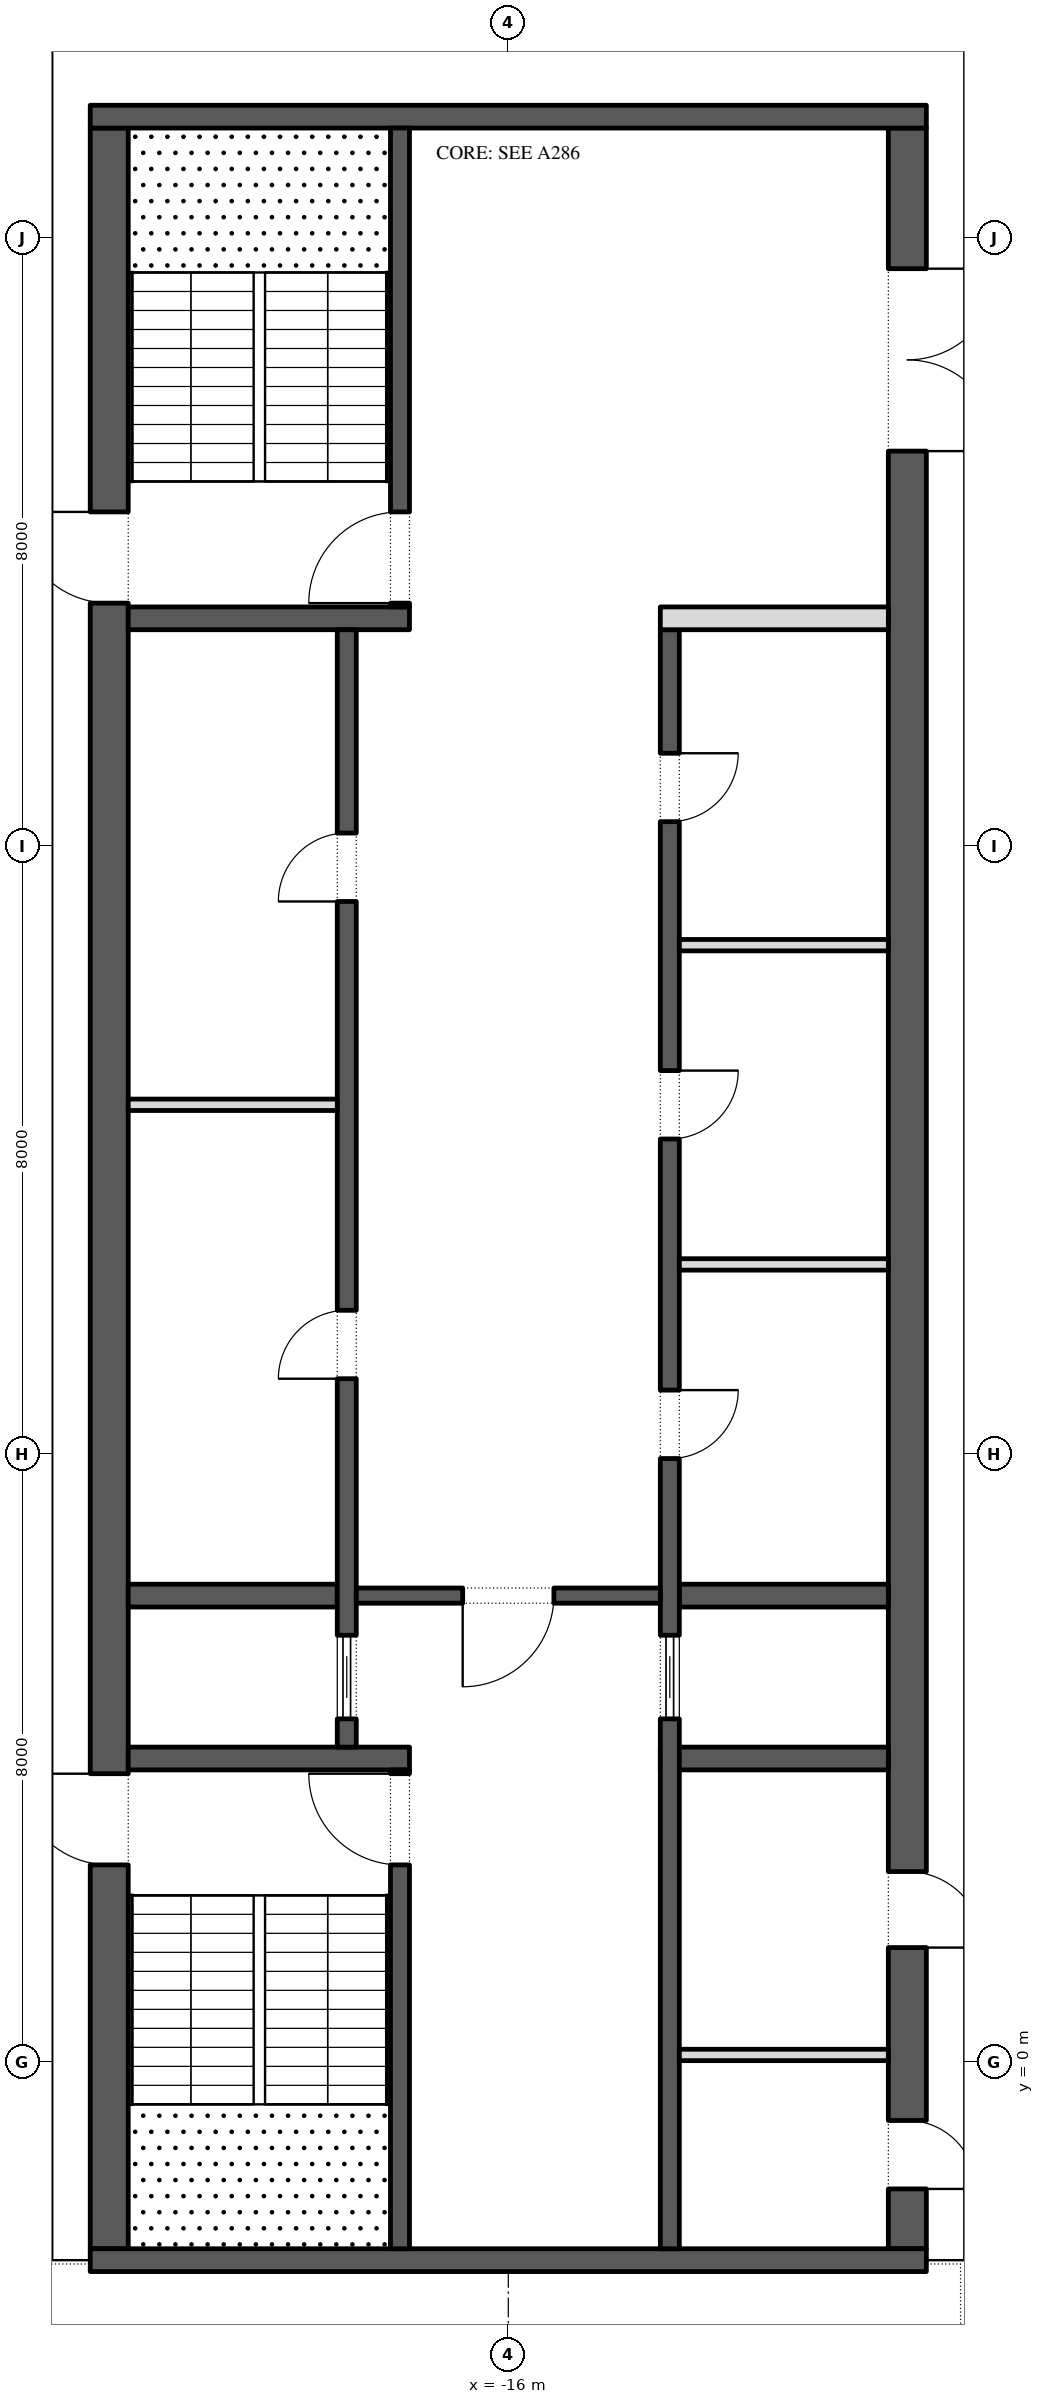
"""IFC4 building model, lengths in metres.
Left out: names, types, materials, properties, quantities, classifications, styles, units other than length and angle.
Written with IfcOpenShell. Run it as: python <this file> out.ifc"""

import sys

from ifc_helpers import new_model, si_unit, direction, frame, frame_2d, origin, place, context, subcontext, project, spatial, rectangle, extrude, element, fill, save


model = new_model("IFC4")
c1 = context("Model", 3, precision=1e-05, world=origin(), true_north=direction((0.0, 1.0)))
c2 = subcontext(c1, "Body", "Model", "MODEL_VIEW")
j1 = project(units=[si_unit("LENGTHUNIT", "METRE"), si_unit("PLANEANGLEUNIT", "RADIAN")], contexts=[c1])
p1 = place(None, origin())
s1 = spatial("IfcSite", under=j1, at=p1, CompositionType="ELEMENT")
p2 = place(p1, origin())
s2 = spatial("IfcBuilding", under=s1, at=p2, CompositionType="ELEMENT")
p3 = place(p2, frame((0.0, 0.0, 377.4)))
s3 = spatial("IfcBuildingStorey", under=s2, at=p3, CompositionType="ELEMENT", Elevation=377.4)
p4 = place(p3, frame((-21.25, -2.45, 0.0), z_axis=(0.0, 0.0, 1.0), x_axis=(0.0, 1.0, 0.0)))
e1 = element("IfcWall", 1, at=p4, inside=s3, PredefinedType="SHEAR", context=c2, shape_type="SweptSolid", body=[
    extrude(rectangle(XDim=27.9, YDim=0.5, at=frame_2d((13.95, 0.0))), origin(), (0.0, 0.0, 1.0), 4.0),
])
p5 = place(p4, frame((5.05, 0.0, 0.0)))
e2 = element("IfcOpeningElement", 2, at=p5, cuts=e1, PredefinedType="OPENING", context=c2, shape_type="SweptSolid", body=[
    extrude(rectangle(XDim=1.2, YDim=2.1, at=frame_2d((0.6, 1.05))), frame((0.0, 0.26, 0.0), z_axis=(0.0, -1.0, 0.0), x_axis=(1.0, 0.0, 0.0)), (0.0, 0.0, 1.0), 0.52),
])
p6 = place(p4, frame((21.65, 0.0, 0.0)))
e3 = element("IfcOpeningElement", 3, at=p6, cuts=e1, PredefinedType="OPENING", context=c2, shape_type="SweptSolid", body=[
    extrude(rectangle(XDim=1.2, YDim=2.1, at=frame_2d((0.6, 1.05))), frame((0.0, 0.26, 0.0), z_axis=(0.0, -1.0, 0.0), x_axis=(1.0, 0.0, 0.0)), (0.0, 0.0, 1.0), 0.52),
])
p7 = place(p3, frame((-10.75, -2.45, 0.0), z_axis=(0.0, 0.0, 1.0), x_axis=(0.0, 1.0, 0.0)))
e4 = element("IfcWall", 4, at=p7, inside=s3, PredefinedType="SHEAR", context=c2, shape_type="SweptSolid", body=[
    extrude(rectangle(XDim=27.9, YDim=0.5, at=frame_2d((13.95, 0.0))), origin(), (0.0, 0.0, 1.0), 4.0),
])
p8 = place(p7, frame((23.65, 0.0, 0.0)))
e5 = element("IfcOpeningElement", 5, at=p8, cuts=e4, PredefinedType="OPENING", context=c2, shape_type="SweptSolid", body=[
    extrude(rectangle(XDim=2.4, YDim=2.1, at=frame_2d((1.2, 1.05))), frame((0.0, 0.26, 0.0), z_axis=(0.0, -1.0, 0.0), x_axis=(1.0, 0.0, 0.0)), (0.0, 0.0, 1.0), 0.52),
])
p9 = place(p7, frame((0.788, 0.0, 0.0)))
e6 = element("IfcOpeningElement", 6, at=p9, cuts=e4, PredefinedType="OPENING", context=c2, shape_type="SweptSolid", body=[
    extrude(rectangle(XDim=0.9, YDim=2.1, at=frame_2d((0.45, 1.05))), frame((0.0, 0.26, 0.0), z_axis=(0.0, -1.0, 0.0), x_axis=(1.0, 0.0, 0.0)), (0.0, 0.0, 1.0), 0.52),
])
p10 = place(p7, frame((3.962, 0.0, 0.0)))
e7 = element("IfcOpeningElement", 7, at=p10, cuts=e4, PredefinedType="OPENING", context=c2, shape_type="SweptSolid", body=[
    extrude(rectangle(XDim=1.0, YDim=2.1, at=frame_2d((0.5, 1.05))), frame((0.0, 0.26, 0.0), z_axis=(0.0, -1.0, 0.0), x_axis=(1.0, 0.0, 0.0)), (0.0, 0.0, 1.0), 0.52),
])
for number, where, z_axis, x_axis in (
    (8, (-21.5, -2.6, 0.0), (0.0, 0.0, 1.0), (1.0, 0.0, 0.0)),
    (9, (-21.5, 25.6, 0.0), (0.0, 0.0, 1.0), (1.0, 0.0, 0.0)),
):
    element("IfcWall", number, at=place(p3, frame(where, z_axis=z_axis, x_axis=x_axis)), inside=s3, PredefinedType="SHEAR", context=c2, shape_type="SweptSolid", body=[
        extrude(rectangle(XDim=11.0, YDim=0.3, at=frame_2d((5.5, 0.0))), origin(), (0.0, 0.0, 1.0), 4.0),
    ])
p11 = place(p3, frame((-21.0, 4.0, 0.0), z_axis=(0.0, 0.0, 1.0), x_axis=(1.0, 0.0, 0.0)))
e10 = element("IfcWall", 10, at=p11, inside=s3, PredefinedType="SHEAR", context=c2, shape_type="SweptSolid", body=[
    extrude(rectangle(XDim=3.7, YDim=0.3, at=frame_2d((1.85, 0.0))), origin(), (0.0, 0.0, 1.0), 4.0),
])
p12 = place(p3, frame((-17.425, -2.45, 0.0), z_axis=(0.0, 0.0, 1.0), x_axis=(0.0, 1.0, 0.0)))
e11 = element("IfcWall", 11, at=p12, inside=s3, PredefinedType="SHEAR", context=c2, shape_type="SweptSolid", body=[
    extrude(rectangle(XDim=6.3, YDim=0.25, at=frame_2d((3.15, 0.0))), origin(), (0.0, 0.0, 1.0), 4.0),
])
p13 = place(p12, frame((5.05, 0.0, 0.0)))
e12 = element("IfcOpeningElement", 12, at=p13, cuts=e11, PredefinedType="OPENING", context=c2, shape_type="SweptSolid", body=[
    extrude(rectangle(XDim=1.2, YDim=2.1, at=frame_2d((0.6, 1.05))), frame((0.0, 0.135, 0.0), z_axis=(0.0, -1.0, 0.0), x_axis=(1.0, 0.0, 0.0)), (0.0, 0.0, 1.0), 0.27),
])
p14 = place(p3, frame((-21.0, 19.0, 0.0), z_axis=(0.0, 0.0, 1.0), x_axis=(1.0, 0.0, 0.0)))
e13 = element("IfcWall", 13, at=p14, inside=s3, PredefinedType="SHEAR", context=c2, shape_type="SweptSolid", body=[
    extrude(rectangle(XDim=3.7, YDim=0.3, at=frame_2d((1.85, 0.0))), origin(), (0.0, 0.0, 1.0), 4.0),
])
p15 = place(p3, frame((-17.425, 19.15, 0.0), z_axis=(0.0, 0.0, 1.0), x_axis=(0.0, 1.0, 0.0)))
e14 = element("IfcWall", 14, at=p15, inside=s3, PredefinedType="SHEAR", context=c2, shape_type="SweptSolid", body=[
    extrude(rectangle(XDim=6.3, YDim=0.25, at=frame_2d((3.15, 0.0))), origin(), (0.0, 0.0, 1.0), 4.0),
])
p16 = place(p15, frame((0.05, 0.0, 0.0)))
e15 = element("IfcOpeningElement", 15, at=p16, cuts=e14, PredefinedType="OPENING", context=c2, shape_type="SweptSolid", body=[
    extrude(rectangle(XDim=1.2, YDim=2.1, at=frame_2d((0.6, 1.05))), frame((0.0, 0.135, 0.0), z_axis=(0.0, -1.0, 0.0), x_axis=(1.0, 0.0, 0.0)), (0.0, 0.0, 1.0), 0.27),
])
p17 = place(p3, frame((-21.0, 6.143, 0.0), z_axis=(0.0, 0.0, 1.0), x_axis=(1.0, 0.0, 0.0)))
e16 = element("IfcWall", 16, at=p17, inside=s3, PredefinedType="SHEAR", context=c2, shape_type="SweptSolid", body=[
    extrude(rectangle(XDim=2.75, YDim=0.3, at=frame_2d((1.375, 0.0))), origin(), (0.0, 0.0, 1.0), 4.0),
])
p18 = place(p3, frame((-18.125, 4.15, 0.0), z_axis=(0.0, 0.0, 1.0), x_axis=(0.0, 1.0, 0.0)))
e17 = element("IfcWall", 17, at=p18, inside=s3, PredefinedType="SHEAR", context=c2, shape_type="SweptSolid", body=[
    extrude(rectangle(XDim=14.7, YDim=0.25, at=frame_2d((7.35, 0.0))), origin(), (0.0, 0.0, 1.0), 4.0),
])
p19 = place(p18, frame((4.846, 0.0, 0.0)))
e18 = element("IfcOpeningElement", 18, at=p19, cuts=e17, PredefinedType="OPENING", context=c2, shape_type="SweptSolid", body=[
    extrude(rectangle(XDim=0.9, YDim=2.1, at=frame_2d((0.45, 1.05))), frame((0.0, 0.135, 0.0), z_axis=(0.0, -1.0, 0.0), x_axis=(1.0, 0.0, 0.0)), (0.0, 0.0, 1.0), 0.27),
])
p20 = place(p18, frame((11.125, 0.0, 0.0)))
e19 = element("IfcOpeningElement", 19, at=p20, cuts=e17, PredefinedType="OPENING", context=c2, shape_type="SweptSolid", body=[
    extrude(rectangle(XDim=0.9, YDim=2.1, at=frame_2d((0.45, 1.05))), frame((0.0, 0.135, 0.0), z_axis=(0.0, -1.0, 0.0), x_axis=(1.0, 0.0, 0.0)), (0.0, 0.0, 1.0), 0.27),
])
p21 = place(p18, frame((0.371, 0.0, 0.0)))
e20 = element("IfcOpeningElement", 20, at=p21, cuts=e17, PredefinedType="OPENING", context=c2, shape_type="SweptSolid", body=[
    extrude(rectangle(XDim=1.1, YDim=2.1, at=frame_2d((0.55, 1.05))), frame((0.0, 0.135, 0.0), z_axis=(0.0, -1.0, 0.0), x_axis=(1.0, 0.0, 0.0)), (0.0, 0.0, 1.0), 0.27),
])
p22 = place(p3, frame((-21.0, 12.6, 0.0), z_axis=(0.0, 0.0, 1.0), x_axis=(1.0, 0.0, 0.0)))
e21 = element("IfcWall", 21, at=p22, inside=s3, PredefinedType="PARTITIONING", context=c2, shape_type="SweptSolid", body=[
    extrude(rectangle(XDim=2.75, YDim=0.15, at=frame_2d((1.375, 0.0))), origin(), (0.0, 0.0, 1.0), 4.0),
])
p23 = place(p3, frame((-14.0, 4.0, 0.0), z_axis=(0.0, 0.0, 1.0), x_axis=(1.0, 0.0, 0.0)))
e22 = element("IfcWall", 22, at=p23, inside=s3, PredefinedType="SHEAR", context=c2, shape_type="SweptSolid", body=[
    extrude(rectangle(XDim=3.0, YDim=0.3, at=frame_2d((1.5, 0.0))), origin(), (0.0, 0.0, 1.0), 4.0),
])
p24 = place(p3, frame((-13.75, 6.143, 0.0), z_axis=(0.0, 0.0, 1.0), x_axis=(1.0, 0.0, 0.0)))
e23 = element("IfcWall", 23, at=p24, inside=s3, PredefinedType="SHEAR", context=c2, shape_type="SweptSolid", body=[
    extrude(rectangle(XDim=2.75, YDim=0.3, at=frame_2d((1.375, 0.0))), origin(), (0.0, 0.0, 1.0), 4.0),
])
p25 = place(p3, frame((-13.875, -2.45, 0.0), z_axis=(0.0, 0.0, 1.0), x_axis=(0.0, 1.0, 0.0)))
e24 = element("IfcWall", 24, at=p25, inside=s3, PredefinedType="SHEAR", context=c2, shape_type="SweptSolid", body=[
    extrude(rectangle(XDim=21.3, YDim=0.25, at=frame_2d((10.65, 0.0))), origin(), (0.0, 0.0, 1.0), 4.0),
])
p26 = place(p25, frame((10.396, 0.0, 0.0)))
e25 = element("IfcOpeningElement", 25, at=p26, cuts=e24, PredefinedType="OPENING", context=c2, shape_type="SweptSolid", body=[
    extrude(rectangle(XDim=0.9, YDim=2.1, at=frame_2d((0.45, 1.05))), frame((0.0, 0.135, 0.0), z_axis=(0.0, -1.0, 0.0), x_axis=(1.0, 0.0, 0.0)), (0.0, 0.0, 1.0), 0.27),
])
p27 = place(p25, frame((14.6, 0.0, 0.0)))
e26 = element("IfcOpeningElement", 26, at=p27, cuts=e24, PredefinedType="OPENING", context=c2, shape_type="SweptSolid", body=[
    extrude(rectangle(XDim=0.9, YDim=2.1, at=frame_2d((0.45, 1.05))), frame((0.0, 0.135, 0.0), z_axis=(0.0, -1.0, 0.0), x_axis=(1.0, 0.0, 0.0)), (0.0, 0.0, 1.0), 0.27),
])
p28 = place(p25, frame((18.775, 0.0, 0.0)))
e27 = element("IfcOpeningElement", 27, at=p28, cuts=e24, PredefinedType="OPENING", context=c2, shape_type="SweptSolid", body=[
    extrude(rectangle(XDim=0.9, YDim=2.1, at=frame_2d((0.45, 1.05))), frame((0.0, 0.135, 0.0), z_axis=(0.0, -1.0, 0.0), x_axis=(1.0, 0.0, 0.0)), (0.0, 0.0, 1.0), 0.27),
])
p29 = place(p25, frame((6.971, 0.0, 0.0)))
e28 = element("IfcOpeningElement", 28, at=p29, cuts=e24, PredefinedType="OPENING", context=c2, shape_type="SweptSolid", body=[
    extrude(rectangle(XDim=1.1, YDim=2.1, at=frame_2d((0.55, 1.05))), frame((0.0, 0.135, 0.0), z_axis=(0.0, -1.0, 0.0), x_axis=(1.0, 0.0, 0.0)), (0.0, 0.0, 1.0), 0.27),
])
p30 = place(p3, frame((-14.0, 19.0, 0.0), z_axis=(0.0, 0.0, 1.0), x_axis=(1.0, 0.0, 0.0)))
e29 = element("IfcWall", 29, at=p30, inside=s3, PredefinedType="PARTITIONING", context=c2, shape_type="SweptSolid", body=[
    extrude(rectangle(XDim=3.0, YDim=0.3, at=frame_2d((1.5, 0.0))), origin(), (0.0, 0.0, 1.0), 4.0),
])
for number, where, z_axis, x_axis in (
    (30, (-13.75, 10.5, 0.0), (0.0, 0.0, 1.0), (1.0, 0.0, 0.0)),
    (31, (-13.75, 14.7, 0.0), (0.0, 0.0, 1.0), (1.0, 0.0, 0.0)),
):
    element("IfcWall", number, at=place(p3, frame(where, z_axis=z_axis, x_axis=x_axis)), inside=s3, PredefinedType="PARTITIONING", context=c2, shape_type="SweptSolid", body=[
        extrude(rectangle(XDim=2.75, YDim=0.15, at=frame_2d((1.375, 0.0))), origin(), (0.0, 0.0, 1.0), 4.0),
    ])
p31 = place(p3, frame((-18.0, 6.143, 0.0), z_axis=(0.0, 0.0, 1.0), x_axis=(1.0, 0.0, 0.0)))
e32 = element("IfcWall", 32, at=p31, inside=s3, PredefinedType="SHEAR", context=c2, shape_type="SweptSolid", body=[
    extrude(rectangle(XDim=4.0, YDim=0.2, at=frame_2d((2.0, 0.0))), origin(), (0.0, 0.0, 1.0), 4.0),
])
p32 = place(p31, frame((1.4, 0.0, 0.0)))
e33 = element("IfcOpeningElement", 33, at=p32, cuts=e32, PredefinedType="OPENING", context=c2, shape_type="SweptSolid", body=[
    extrude(rectangle(XDim=1.2, YDim=2.1, at=frame_2d((0.6, 1.05))), frame((0.0, 0.11, 0.0), z_axis=(0.0, -1.0, 0.0), x_axis=(1.0, 0.0, 0.0)), (0.0, 0.0, 1.0), 0.22),
])
p33 = place(p3, frame((-13.75, 0.1, 0.0), z_axis=(0.0, 0.0, 1.0), x_axis=(1.0, 0.0, 0.0)))
e34 = element("IfcWall", 34, at=p33, inside=s3, PredefinedType="PARTITIONING", context=c2, shape_type="SweptSolid", body=[
    extrude(rectangle(XDim=2.75, YDim=0.15, at=frame_2d((1.375, 0.0))), origin(), (0.0, 0.0, 1.0), 4.0),
])
p34 = place(p19, origin())
e35 = element("IfcDoor", 35, at=p34, inside=s3, OperationType="SINGLE_SWING_RIGHT", PredefinedType="DOOR", context=c2, shape_type="SweptSolid", body=[
    extrude(rectangle(XDim=0.9, YDim=2.1, at=frame_2d((0.45, 1.05))), frame((0.0, 0.125, 0.0), z_axis=(0.0, -1.0, 0.0), x_axis=(1.0, 0.0, 0.0)), (0.0, 0.0, 1.0), 0.05),
])
fill(e18, e35)
p35 = place(p20, origin())
e36 = element("IfcDoor", 36, at=p35, inside=s3, OperationType="SINGLE_SWING_RIGHT", PredefinedType="DOOR", context=c2, shape_type="SweptSolid", body=[
    extrude(rectangle(XDim=0.9, YDim=2.1, at=frame_2d((0.45, 1.05))), frame((0.0, 0.125, 0.0), z_axis=(0.0, -1.0, 0.0), x_axis=(1.0, 0.0, 0.0)), (0.0, 0.0, 1.0), 0.05),
])
fill(e19, e36)
p36 = place(p21, origin())
e37 = element("IfcDoor", 37, at=p36, inside=s3, OperationType="SLIDING_TO_LEFT", PredefinedType="DOOR", context=c2, shape_type="SweptSolid", body=[
    extrude(rectangle(XDim=1.1, YDim=2.1, at=frame_2d((0.55, 1.05))), frame((0.0, 0.025, 0.0), z_axis=(0.0, -1.0, 0.0), x_axis=(1.0, 0.0, 0.0)), (0.0, 0.0, 1.0), 0.05),
])
fill(e20, e37)
p37 = place(p26, frame((0.9, -0.2, 0.0), z_axis=(0.0, 0.0, 1.0), x_axis=(-1.0, 0.0, 0.0)))
e38 = element("IfcDoor", 38, at=p37, inside=s3, OperationType="SINGLE_SWING_RIGHT", PredefinedType="DOOR", context=c2, shape_type="SweptSolid", body=[
    extrude(rectangle(XDim=0.9, YDim=2.1, at=frame_2d((0.45, 1.05))), frame((0.0, -0.075, 0.0), z_axis=(0.0, -1.0, 0.0), x_axis=(1.0, 0.0, 0.0)), (0.0, 0.0, 1.0), 0.05),
])
fill(e25, e38)
p38 = place(p27, frame((0.9, -0.2, 0.0), z_axis=(0.0, 0.0, 1.0), x_axis=(-1.0, 0.0, 0.0)))
e39 = element("IfcDoor", 39, at=p38, inside=s3, OperationType="SINGLE_SWING_RIGHT", PredefinedType="DOOR", context=c2, shape_type="SweptSolid", body=[
    extrude(rectangle(XDim=0.9, YDim=2.1, at=frame_2d((0.45, 1.05))), frame((0.0, -0.075, 0.0), z_axis=(0.0, -1.0, 0.0), x_axis=(1.0, 0.0, 0.0)), (0.0, 0.0, 1.0), 0.05),
])
fill(e26, e39)
p39 = place(p28, frame((0.9, -0.2, 0.0), z_axis=(0.0, 0.0, 1.0), x_axis=(-1.0, 0.0, 0.0)))
e40 = element("IfcDoor", 40, at=p39, inside=s3, OperationType="SINGLE_SWING_RIGHT", PredefinedType="DOOR", context=c2, shape_type="SweptSolid", body=[
    extrude(rectangle(XDim=0.9, YDim=2.1, at=frame_2d((0.45, 1.05))), frame((0.0, -0.075, 0.0), z_axis=(0.0, -1.0, 0.0), x_axis=(1.0, 0.0, 0.0)), (0.0, 0.0, 1.0), 0.05),
])
fill(e27, e40)
p40 = place(p29, origin())
e41 = element("IfcDoor", 41, at=p40, inside=s3, OperationType="SLIDING_TO_LEFT", PredefinedType="DOOR", context=c2, shape_type="SweptSolid", body=[
    extrude(rectangle(XDim=1.1, YDim=2.1, at=frame_2d((0.55, 1.05))), frame((0.0, 0.025, 0.0), z_axis=(0.0, -1.0, 0.0), x_axis=(1.0, 0.0, 0.0)), (0.0, 0.0, 1.0), 0.05),
])
fill(e28, e41)
p41 = place(p32, frame((1.2, 0.0, 0.0), z_axis=(0.0, 0.0, 1.0), x_axis=(-1.0, 0.0, 0.0)))
e42 = element("IfcDoor", 42, at=p41, inside=s3, OperationType="SINGLE_SWING_LEFT", PredefinedType="DOOR", context=c2, shape_type="SweptSolid", body=[
    extrude(rectangle(XDim=1.2, YDim=2.1, at=frame_2d((0.6, 1.05))), frame((0.0, 0.025, 0.0), z_axis=(0.0, -1.0, 0.0), x_axis=(1.0, 0.0, 0.0)), (0.0, 0.0, 1.0), 0.05),
])
fill(e33, e42)
p42 = place(p8, frame((2.4, 0.0, 0.0), z_axis=(0.0, 0.0, 1.0), x_axis=(-1.0, 0.0, 0.0)))
e43 = element("IfcDoor", 43, at=p42, inside=s3, OperationType="DOUBLE_DOOR_SINGLE_SWING", PredefinedType="DOOR", context=c2, shape_type="SweptSolid", body=[
    extrude(rectangle(XDim=2.4, YDim=2.1, at=frame_2d((1.2, 1.05))), frame((0.0, 0.025, 0.0), z_axis=(0.0, -1.0, 0.0), x_axis=(1.0, 0.0, 0.0)), (0.0, 0.0, 1.0), 0.05),
])
fill(e5, e43)
p43 = place(p13, origin())
e44 = element("IfcDoor", 44, at=p43, inside=s3, OperationType="SINGLE_SWING_LEFT", PredefinedType="DOOR", context=c2, shape_type="SweptSolid", body=[
    extrude(rectangle(XDim=1.2, YDim=2.1, at=frame_2d((0.6, 1.05))), frame((0.0, 0.025, 0.0), z_axis=(0.0, -1.0, 0.0), x_axis=(1.0, 0.0, 0.0)), (0.0, 0.0, 1.0), 0.05),
])
fill(e12, e44)
p44 = place(p5, origin())
e45 = element("IfcDoor", 45, at=p44, inside=s3, OperationType="SINGLE_SWING_LEFT", PredefinedType="DOOR", context=c2, shape_type="SweptSolid", body=[
    extrude(rectangle(XDim=1.2, YDim=2.1, at=frame_2d((0.6, 1.05))), frame((0.0, 0.025, 0.0), z_axis=(0.0, -1.0, 0.0), x_axis=(1.0, 0.0, 0.0)), (0.0, 0.0, 1.0), 0.05),
])
fill(e2, e45)
p45 = place(p16, origin())
e46 = element("IfcDoor", 46, at=p45, inside=s3, OperationType="SINGLE_SWING_RIGHT", PredefinedType="DOOR", context=c2, shape_type="SweptSolid", body=[
    extrude(rectangle(XDim=1.2, YDim=2.1, at=frame_2d((0.6, 1.05))), frame((0.0, 0.025, 0.0), z_axis=(0.0, -1.0, 0.0), x_axis=(1.0, 0.0, 0.0)), (0.0, 0.0, 1.0), 0.05),
])
fill(e15, e46)
p46 = place(p6, origin())
e47 = element("IfcDoor", 47, at=p46, inside=s3, OperationType="SINGLE_SWING_LEFT", PredefinedType="DOOR", context=c2, shape_type="SweptSolid", body=[
    extrude(rectangle(XDim=1.2, YDim=2.1, at=frame_2d((0.6, 1.05))), frame((0.0, 0.025, 0.0), z_axis=(0.0, -1.0, 0.0), x_axis=(1.0, 0.0, 0.0)), (0.0, 0.0, 1.0), 0.05),
])
fill(e3, e47)
p47 = place(p9, frame((0.9, 0.45, 0.0), z_axis=(0.0, 0.0, 1.0), x_axis=(-1.0, 0.0, 0.0)))
e48 = element("IfcDoor", 48, at=p47, inside=s3, OperationType="SINGLE_SWING_LEFT", PredefinedType="DOOR", context=c2, shape_type="SweptSolid", body=[
    extrude(rectangle(XDim=0.9, YDim=2.1, at=frame_2d((0.45, 1.05))), frame((0.0, 0.25, 0.0), z_axis=(0.0, -1.0, 0.0), x_axis=(1.0, 0.0, 0.0)), (0.0, 0.0, 1.0), 0.05),
])
fill(e6, e48)
p48 = place(p10, frame((1.0, 0.45, 0.0), z_axis=(0.0, 0.0, 1.0), x_axis=(-1.0, 0.0, 0.0)))
e49 = element("IfcDoor", 49, at=p48, inside=s3, OperationType="SINGLE_SWING_LEFT", PredefinedType="DOOR", context=c2, shape_type="SweptSolid", body=[
    extrude(rectangle(XDim=1.0, YDim=2.1, at=frame_2d((0.5, 1.05))), frame((0.0, 0.25, 0.0), z_axis=(0.0, -1.0, 0.0), x_axis=(1.0, 0.0, 0.0)), (0.0, 0.0, 1.0), 0.05),
])
fill(e7, e49)
save(model, sys.argv[1])
